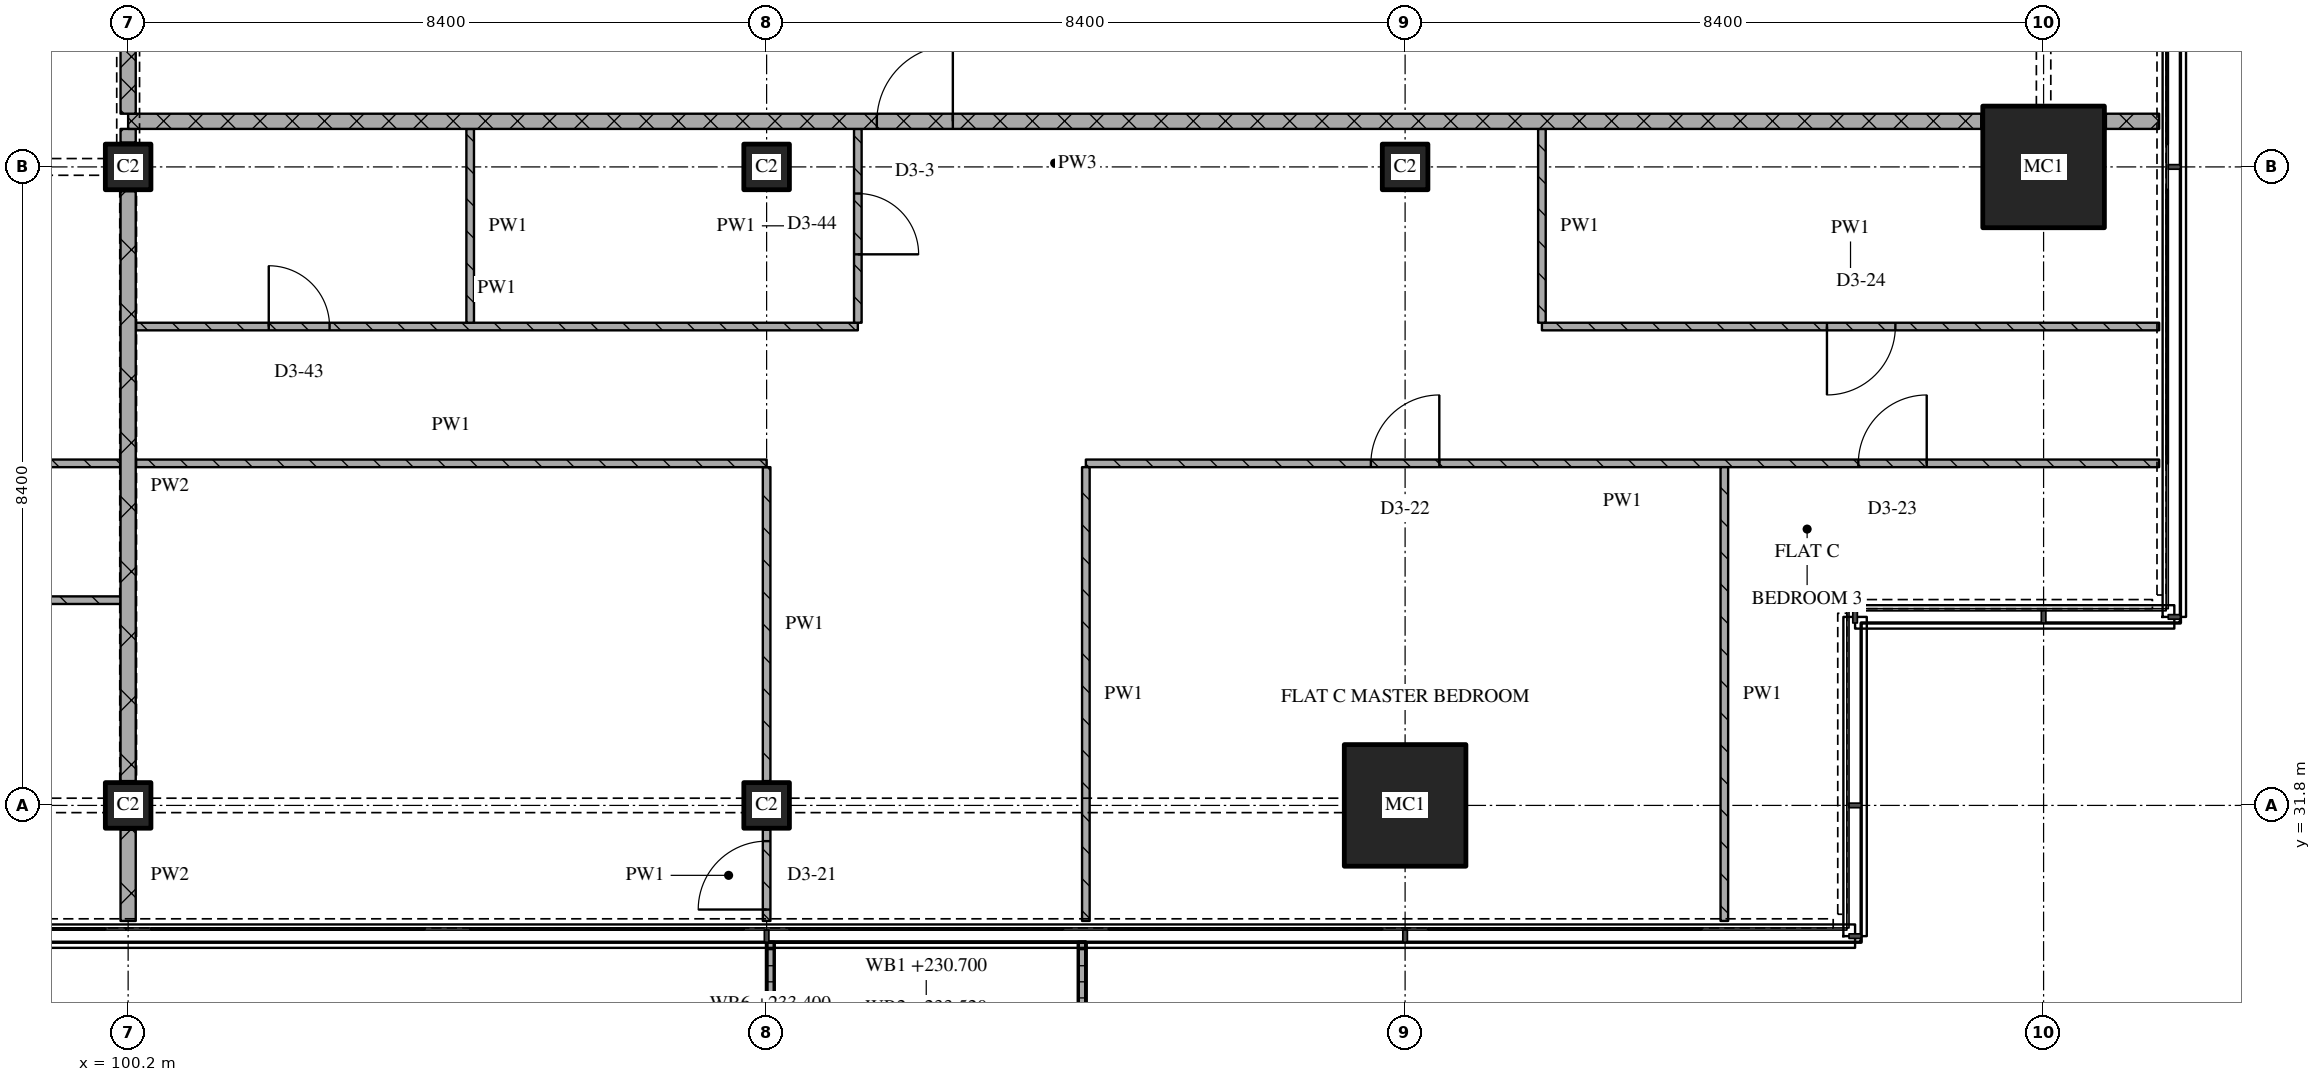
"""IFC4 building model, lengths in metres.
Left out: names, types, materials, properties, quantities, classifications, styles, units other than length and angle.
Written with IfcOpenShell. Run it as: python <this file> out.ifc"""

import sys

from ifc_helpers import new_model, si_unit, direction, frame, frame_2d, origin, origin_2d, place, context, subcontext, project, spatial, polyline, rectangle, outline, extrude, element, fill, save


model = new_model("IFC4")
c1 = context("Model", 3, precision=1e-05, world=origin(), true_north=direction((0.0, 1.0)))
c2 = subcontext(c1, "Body", "Model", "MODEL_VIEW")
j1 = project(units=[si_unit("LENGTHUNIT", "METRE"), si_unit("PLANEANGLEUNIT", "RADIAN")], contexts=[c1])
p1 = place(None, origin())
s1 = spatial("IfcSite", under=j1, at=p1, CompositionType="ELEMENT")
p2 = place(p1, origin())
s2 = spatial("IfcBuilding", under=s1, at=p2, CompositionType="ELEMENT")
p3 = place(p2, frame((0.0, 0.0, 230.7)))
s3 = spatial("IfcBuildingStorey", under=s2, at=p3, CompositionType="ELEMENT", Elevation=230.7)
for number, where, z_axis, x_axis in (
    (1, (100.2, 31.8, 0.0), (0.0, 0.0, 1.0), (1.0, 0.0, 0.0)),
    (2, (100.2, 40.2, 0.0), (0.0, 0.0, 1.0), (1.0, 0.0, 0.0)),
    (3, (108.6, 31.8, 0.0), (0.0, 0.0, 1.0), (1.0, 0.0, 0.0)),
    (4, (108.6, 40.2, 0.0), (0.0, 0.0, 1.0), (1.0, 0.0, 0.0)),
):
    element("IfcColumn", number, at=place(p3, frame(where, z_axis=z_axis, x_axis=x_axis)), inside=s3, PredefinedType="COLUMN", context=c2, shape_type="SweptSolid", body=[
        extrude(rectangle(XDim=0.6, YDim=0.6, at=origin_2d()), origin(), (0.0, 0.0, 1.0), 3.6),
    ])
p4 = place(p3, frame((117.0, 31.8, 0.0), z_axis=(0.0, 0.0, 1.0), x_axis=(1.0, 0.0, 0.0)))
e5 = element("IfcColumn", 5, at=p4, inside=s3, PredefinedType="COLUMN", context=c2, shape_type="SweptSolid", body=[
    extrude(rectangle(XDim=1.6, YDim=1.6, at=origin_2d()), origin(), (0.0, 0.0, 1.0), 3.6),
])
p5 = place(p3, frame((117.0, 40.2, 0.0), z_axis=(0.0, 0.0, 1.0), x_axis=(1.0, 0.0, 0.0)))
e6 = element("IfcColumn", 6, at=p5, inside=s3, PredefinedType="COLUMN", context=c2, shape_type="SweptSolid", body=[
    extrude(rectangle(XDim=0.6, YDim=0.6, at=origin_2d()), origin(), (0.0, 0.0, 1.0), 3.6),
])
p6 = place(p3, frame((125.4, 40.2, 0.0), z_axis=(0.0, 0.0, 1.0), x_axis=(1.0, 0.0, 0.0)))
e7 = element("IfcColumn", 7, at=p6, inside=s3, PredefinedType="COLUMN", context=c2, shape_type="SweptSolid", body=[
    extrude(rectangle(XDim=1.6, YDim=1.6, at=origin_2d()), origin(), (0.0, 0.0, 1.0), 3.6),
])
p7 = place(p3, origin())
e8 = element("IfcWall", 8, at=p7, inside=s3, PredefinedType="SOLIDWALL", context=c2, shape_type="SweptSolid", body=[
    extrude(outline(polyline([(108.6, 30.0), (108.7, 30.0), (108.7, 28.367), (112.7, 28.367), (112.7, 30.0), (112.8, 30.0), (112.8, 28.267), (108.6, 28.267), (108.6, 30.0)])), origin(), (0.0, 0.0, 1.0), 1.0),
])
p8 = place(p3, frame((100.1, 34.5, 0.0), z_axis=(0.0, 0.0, 1.0), x_axis=(-1.0, 0.0, 0.0)))
e9 = element("IfcWall", 9, at=p8, inside=s3, PredefinedType="PARTITIONING", context=c2, shape_type="SweptSolid", body=[
    extrude(rectangle(XDim=20.9, YDim=0.1, at=frame_2d((10.45, 0.0))), origin(), (0.0, 0.0, 1.0), 3.32),
])
p9 = place(p8, frame((3.65, 0.0, 0.0)))
e10 = element("IfcOpeningElement", 10, at=p9, cuts=e9, PredefinedType="OPENING", context=c2, shape_type="SweptSolid", body=[
    extrude(rectangle(XDim=0.9, YDim=2.1, at=frame_2d((0.45, 1.05))), frame((0.0, 0.06, 0.0), z_axis=(0.0, -1.0, 0.0), x_axis=(1.0, 0.0, 0.0)), (0.0, 0.0, 1.0), 0.12),
])
p10 = place(p8, frame((9.95, 0.0, 0.0)))
e11 = element("IfcOpeningElement", 11, at=p10, cuts=e9, PredefinedType="OPENING", context=c2, shape_type="SweptSolid", body=[
    extrude(rectangle(XDim=0.9, YDim=2.1, at=frame_2d((0.45, 1.05))), frame((0.0, 0.06, 0.0), z_axis=(0.0, -1.0, 0.0), x_axis=(1.0, 0.0, 0.0)), (0.0, 0.0, 1.0), 0.12),
])
p11 = place(p8, frame((14.15, 0.0, 0.0)))
e12 = element("IfcOpeningElement", 12, at=p11, cuts=e9, PredefinedType="OPENING", context=c2, shape_type="SweptSolid", body=[
    extrude(rectangle(XDim=0.9, YDim=2.1, at=frame_2d((0.45, 1.05))), frame((0.0, 0.06, 0.0), z_axis=(0.0, -1.0, 0.0), x_axis=(1.0, 0.0, 0.0)), (0.0, 0.0, 1.0), 0.12),
])
p12 = place(p8, frame((18.35, 0.0, 0.0)))
e13 = element("IfcOpeningElement", 13, at=p12, cuts=e9, PredefinedType="OPENING", context=c2, shape_type="SweptSolid", body=[
    extrude(rectangle(XDim=0.9, YDim=2.1, at=frame_2d((0.45, 1.05))), frame((0.0, 0.06, 0.0), z_axis=(0.0, -1.0, 0.0), x_axis=(1.0, 0.0, 0.0)), (0.0, 0.0, 1.0), 0.12),
])
p13 = place(p3, frame((126.92, 36.3, 0.0), z_axis=(0.0, 0.0, 1.0), x_axis=(-1.0, 0.0, 0.0)))
e14 = element("IfcWall", 14, at=p13, inside=s3, PredefinedType="PARTITIONING", context=c2, shape_type="SweptSolid", body=[
    extrude(rectangle(XDim=14.12, YDim=0.1, at=frame_2d((7.06, 0.0))), origin(), (0.0, 0.0, 1.0), 3.32),
])
p14 = place(p13, frame((3.058, 0.0, 0.0)))
e15 = element("IfcOpeningElement", 15, at=p14, cuts=e14, PredefinedType="OPENING", context=c2, shape_type="SweptSolid", body=[
    extrude(rectangle(XDim=0.9, YDim=2.1, at=frame_2d((0.45, 1.05))), frame((0.0, 0.06, 0.0), z_axis=(0.0, -1.0, 0.0), x_axis=(1.0, 0.0, 0.0)), (0.0, 0.0, 1.0), 0.12),
])
p15 = place(p13, frame((9.47, 0.0, 0.0)))
e16 = element("IfcOpeningElement", 16, at=p15, cuts=e14, PredefinedType="OPENING", context=c2, shape_type="SweptSolid", body=[
    extrude(rectangle(XDim=0.9, YDim=2.1, at=frame_2d((0.45, 1.05))), frame((0.0, 0.06, 0.0), z_axis=(0.0, -1.0, 0.0), x_axis=(1.0, 0.0, 0.0)), (0.0, 0.0, 1.0), 0.12),
])
p16 = place(p3, frame((100.3, 38.1, 0.0), z_axis=(0.0, 0.0, 1.0), x_axis=(1.0, 0.0, 0.0)))
e17 = element("IfcWall", 17, at=p16, inside=s3, PredefinedType="PARTITIONING", context=c2, shape_type="SweptSolid", body=[
    extrude(rectangle(XDim=9.5, YDim=0.1, at=frame_2d((4.75, 0.0))), origin(), (0.0, 0.0, 1.0), 3.32),
])
p17 = place(p16, frame((1.75, 0.0, 0.0)))
e18 = element("IfcOpeningElement", 18, at=p17, cuts=e17, PredefinedType="OPENING", context=c2, shape_type="SweptSolid", body=[
    extrude(rectangle(XDim=0.8, YDim=2.1, at=frame_2d((0.4, 1.05))), frame((0.0, 0.06, 0.0), z_axis=(0.0, -1.0, 0.0), x_axis=(1.0, 0.0, 0.0)), (0.0, 0.0, 1.0), 0.12),
])
p18 = place(p3, frame((118.8, 38.1, 0.0), z_axis=(0.0, 0.0, 1.0), x_axis=(1.0, 0.0, 0.0)))
e19 = element("IfcWall", 19, at=p18, inside=s3, PredefinedType="PARTITIONING", context=c2, shape_type="SweptSolid", body=[
    extrude(rectangle(XDim=8.12, YDim=0.1, at=frame_2d((4.06, 0.0))), origin(), (0.0, 0.0, 1.0), 3.32),
])
p19 = place(p18, frame((3.75, 0.0, 0.0)))
e20 = element("IfcOpeningElement", 20, at=p19, cuts=e19, PredefinedType="OPENING", context=c2, shape_type="SweptSolid", body=[
    extrude(rectangle(XDim=0.9, YDim=2.1, at=frame_2d((0.45, 1.05))), frame((0.0, 0.06, 0.0), z_axis=(0.0, -1.0, 0.0), x_axis=(1.0, 0.0, 0.0)), (0.0, 0.0, 1.0), 0.12),
])
p20 = place(p3, frame((124.58, 40.8, 0.0), z_axis=(0.0, 0.0, 1.0), x_axis=(-1.0, 0.0, 0.0)))
e21 = element("IfcWall", 21, at=p20, inside=s3, PredefinedType="PARTITIONING", context=c2, shape_type="SweptSolid", body=[
    extrude(rectangle(XDim=24.38, YDim=0.2, at=frame_2d((12.19, 0.0))), origin(), (0.0, 0.0, 1.0), 3.32),
])
p21 = place(p20, frame((13.53, 0.0, 0.0)))
e22 = element("IfcOpeningElement", 22, at=p21, cuts=e21, PredefinedType="OPENING", context=c2, shape_type="SweptSolid", body=[
    extrude(rectangle(XDim=1.0, YDim=2.1, at=frame_2d((0.5, 1.05))), frame((0.0, 0.11, 0.0), z_axis=(0.0, -1.0, 0.0), x_axis=(1.0, 0.0, 0.0)), (0.0, 0.0, 1.0), 0.22),
])
p22 = place(p3, frame((126.22, 40.8, 0.0), z_axis=(0.0, 0.0, 1.0), x_axis=(1.0, 0.0, 0.0)))
e23 = element("IfcWall", 23, at=p22, inside=s3, PredefinedType="PARTITIONING", context=c2, shape_type="SweptSolid", body=[
    extrude(rectangle(XDim=0.7, YDim=0.2, at=frame_2d((0.35, 0.0))), origin(), (0.0, 0.0, 1.0), 3.32),
])
p23 = place(p3, frame((100.2, 43.1, 0.0), z_axis=(0.0, 0.0, 1.0), x_axis=(0.0, -1.0, 0.0)))
e24 = element("IfcWall", 24, at=p23, inside=s3, PredefinedType="PARTITIONING", context=c2, shape_type="SweptSolid", body=[
    extrude(rectangle(XDim=2.2, YDim=0.2, at=frame_2d((1.1, 0.0))), origin(), (0.0, 0.0, 1.0), 2.53),
])
p24 = place(p3, frame((100.2, 31.48, 0.0), z_axis=(0.0, 0.0, 1.0), x_axis=(0.0, -1.0, 0.0)))
e25 = element("IfcWall", 25, at=p24, inside=s3, PredefinedType="PARTITIONING", context=c2, shape_type="SweptSolid", body=[
    extrude(rectangle(XDim=1.2, YDim=0.2, at=frame_2d((0.6, 0.0))), origin(), (0.0, 0.0, 1.0), 3.32),
])
p25 = place(p3, frame((100.2, 39.88, 0.0), z_axis=(0.0, 0.0, 1.0), x_axis=(0.0, -1.0, 0.0)))
e26 = element("IfcWall", 26, at=p25, inside=s3, PredefinedType="PARTITIONING", context=c2, shape_type="SweptSolid", body=[
    extrude(rectangle(XDim=7.76, YDim=0.2, at=frame_2d((3.88, 0.0))), origin(), (0.0, 0.0, 1.0), 2.72),
])
p26 = place(p3, frame((100.2, 40.7, 0.0), z_axis=(0.0, 0.0, 1.0), x_axis=(0.0, -1.0, 0.0)))
e27 = element("IfcWall", 27, at=p26, inside=s3, PredefinedType="PARTITIONING", context=c2, shape_type="SweptSolid", body=[
    extrude(rectangle(XDim=0.18, YDim=0.2, at=frame_2d((0.09, 0.0))), origin(), (0.0, 0.0, 1.0), 3.32),
])
p27 = place(p3, frame((104.7, 40.7, 0.0), z_axis=(0.0, 0.0, 1.0), x_axis=(0.0, -1.0, 0.0)))
e28 = element("IfcWall", 28, at=p27, inside=s3, PredefinedType="PARTITIONING", context=c2, shape_type="SweptSolid", body=[
    extrude(rectangle(XDim=2.55, YDim=0.1, at=frame_2d((1.275, 0.0))), origin(), (0.0, 0.0, 1.0), 3.32),
])
p28 = place(p3, frame((108.6, 30.28, 0.0), z_axis=(0.0, 0.0, 1.0), x_axis=(0.0, 1.0, 0.0)))
e29 = element("IfcWall", 29, at=p28, inside=s3, PredefinedType="PARTITIONING", context=c2, shape_type="SweptSolid", body=[
    extrude(rectangle(XDim=1.2, YDim=0.1, at=frame_2d((0.6, 0.0))), origin(), (0.0, 0.0, 1.0), 3.32),
])
p29 = place(p28, frame((0.15, 0.0, 0.0)))
e30 = element("IfcOpeningElement", 30, at=p29, cuts=e29, PredefinedType="OPENING", context=c2, shape_type="SweptSolid", body=[
    extrude(rectangle(XDim=0.9, YDim=2.1, at=frame_2d((0.45, 1.05))), frame((0.0, 0.06, 0.0), z_axis=(0.0, -1.0, 0.0), x_axis=(1.0, 0.0, 0.0)), (0.0, 0.0, 1.0), 0.12),
])
p30 = place(p3, frame((108.6, 36.25, 0.0), z_axis=(0.0, 0.0, 1.0), x_axis=(0.0, -1.0, 0.0)))
e31 = element("IfcWall", 31, at=p30, inside=s3, PredefinedType="PARTITIONING", context=c2, shape_type="SweptSolid", body=[
    extrude(rectangle(XDim=4.13, YDim=0.1, at=frame_2d((2.065, 0.0))), origin(), (0.0, 0.0, 1.0), 3.32),
])
p31 = place(p3, frame((109.8, 38.15, 0.0), z_axis=(0.0, 0.0, 1.0), x_axis=(0.0, 1.0, 0.0)))
e32 = element("IfcWall", 32, at=p31, inside=s3, PredefinedType="PARTITIONING", context=c2, shape_type="SweptSolid", body=[
    extrude(rectangle(XDim=2.55, YDim=0.1, at=frame_2d((1.275, 0.0))), origin(), (0.0, 0.0, 1.0), 3.32),
])
p32 = place(p31, frame((0.9, 0.0, 0.0)))
e33 = element("IfcOpeningElement", 33, at=p32, cuts=e32, PredefinedType="OPENING", context=c2, shape_type="SweptSolid", body=[
    extrude(rectangle(XDim=0.8, YDim=2.1, at=frame_2d((0.4, 1.05))), frame((0.0, 0.06, 0.0), z_axis=(0.0, -1.0, 0.0), x_axis=(1.0, 0.0, 0.0)), (0.0, 0.0, 1.0), 0.12),
])
p33 = place(p3, frame((112.8, 36.25, 0.0), z_axis=(0.0, 0.0, 1.0), x_axis=(0.0, -1.0, 0.0)))
e34 = element("IfcWall", 34, at=p33, inside=s3, PredefinedType="PARTITIONING", context=c2, shape_type="SweptSolid", body=[
    extrude(rectangle(XDim=5.97, YDim=0.1, at=frame_2d((2.985, 0.0))), origin(), (0.0, 0.0, 1.0), 3.32),
])
p34 = place(p3, frame((118.8, 40.7, 0.0), z_axis=(0.0, 0.0, 1.0), x_axis=(0.0, -1.0, 0.0)))
e35 = element("IfcWall", 35, at=p34, inside=s3, PredefinedType="PARTITIONING", context=c2, shape_type="SweptSolid", body=[
    extrude(rectangle(XDim=2.55, YDim=0.1, at=frame_2d((1.275, 0.0))), origin(), (0.0, 0.0, 1.0), 3.32),
])
p35 = place(p3, frame((121.2, 36.25, 0.0), z_axis=(0.0, 0.0, 1.0), x_axis=(0.0, -1.0, 0.0)))
e36 = element("IfcWall", 36, at=p35, inside=s3, PredefinedType="PARTITIONING", context=c2, shape_type="SweptSolid", body=[
    extrude(rectangle(XDim=5.97, YDim=0.1, at=frame_2d((2.985, 0.0))), origin(), (0.0, 0.0, 1.0), 3.32),
])
p36 = place(p3, frame((92.942, 36.3, 0.0), z_axis=(0.0, 0.0, 1.0), x_axis=(1.0, 0.0, 0.0)))
e37 = element("IfcWall", 37, at=p36, inside=s3, PredefinedType="PARTITIONING", context=c2, shape_type="SweptSolid", body=[
    extrude(rectangle(XDim=7.158, YDim=0.1, at=frame_2d((3.579, 0.0))), origin(), (0.0, 0.0, 1.0), 3.32),
])
p37 = place(p36, frame((3.179, 0.0, 0.0)))
e38 = element("IfcOpeningElement", 38, at=p37, cuts=e37, PredefinedType="OPENING", context=c2, shape_type="SweptSolid", body=[
    extrude(rectangle(XDim=0.9, YDim=2.1, at=frame_2d((0.45, 1.05))), frame((0.0, 0.06, 0.0), z_axis=(0.0, -1.0, 0.0), x_axis=(1.0, 0.0, 0.0)), (0.0, 0.0, 1.0), 0.12),
])
p38 = place(p3, frame((100.3, 36.3, 0.0), z_axis=(0.0, 0.0, 1.0), x_axis=(1.0, 0.0, 0.0)))
e39 = element("IfcWall", 39, at=p38, inside=s3, PredefinedType="PARTITIONING", context=c2, shape_type="SweptSolid", body=[
    extrude(rectangle(XDim=8.3, YDim=0.1, at=frame_2d((4.15, 0.0))), origin(), (0.0, 0.0, 1.0), 3.32),
])
p39 = place(p14, origin())
e40 = element("IfcDoor", 40, at=p39, inside=s3, OperationType="SINGLE_SWING_RIGHT", PredefinedType="DOOR", context=c2, shape_type="SweptSolid", body=[
    extrude(rectangle(XDim=0.9, YDim=2.1, at=frame_2d((0.45, 1.05))), frame((0.0, 0.025, 0.0), z_axis=(0.0, -1.0, 0.0), x_axis=(1.0, 0.0, 0.0)), (0.0, 0.0, 1.0), 0.05),
])
fill(e15, e40)
p40 = place(p15, origin())
e41 = element("IfcDoor", 41, at=p40, inside=s3, OperationType="SINGLE_SWING_RIGHT", PredefinedType="DOOR", context=c2, shape_type="SweptSolid", body=[
    extrude(rectangle(XDim=0.9, YDim=2.1, at=frame_2d((0.45, 1.05))), frame((0.0, 0.025, 0.0), z_axis=(0.0, -1.0, 0.0), x_axis=(1.0, 0.0, 0.0)), (0.0, 0.0, 1.0), 0.05),
])
fill(e16, e41)
p41 = place(p17, origin())
e42 = element("IfcDoor", 42, at=p41, inside=s3, OperationType="SINGLE_SWING_LEFT", PredefinedType="DOOR", context=c2, shape_type="SweptSolid", body=[
    extrude(rectangle(XDim=0.8, YDim=2.1, at=frame_2d((0.4, 1.05))), frame((0.0, 0.025, 0.0), z_axis=(0.0, -1.0, 0.0), x_axis=(1.0, 0.0, 0.0)), (0.0, 0.0, 1.0), 0.05),
])
fill(e18, e42)
p42 = place(p19, origin())
e43 = element("IfcDoor", 43, at=p42, inside=s3, OperationType="SINGLE_SWING_RIGHT", PredefinedType="DOOR", context=c2, shape_type="SweptSolid", body=[
    extrude(rectangle(XDim=0.9, YDim=2.1, at=frame_2d((0.45, 1.05))), frame((0.0, 0.025, 0.0), z_axis=(0.0, -1.0, 0.0), x_axis=(1.0, 0.0, 0.0)), (0.0, 0.0, 1.0), 0.05),
])
fill(e20, e43)
p43 = place(p21, origin())
e44 = element("IfcDoor", 44, at=p43, inside=s3, OperationType="SINGLE_SWING_RIGHT", PredefinedType="DOOR", context=c2, shape_type="SweptSolid", body=[
    extrude(rectangle(XDim=1.0, YDim=2.1, at=frame_2d((0.5, 1.05))), frame((0.0, 0.025, 0.0), z_axis=(0.0, -1.0, 0.0), x_axis=(1.0, 0.0, 0.0)), (0.0, 0.0, 1.0), 0.05),
])
fill(e22, e44)
p44 = place(p29, origin())
e45 = element("IfcDoor", 45, at=p44, inside=s3, OperationType="SINGLE_SWING_LEFT", PredefinedType="DOOR", context=c2, shape_type="SweptSolid", body=[
    extrude(rectangle(XDim=0.9, YDim=2.1, at=frame_2d((0.45, 1.05))), frame((0.0, 0.025, 0.0), z_axis=(0.0, -1.0, 0.0), x_axis=(1.0, 0.0, 0.0)), (0.0, 0.0, 1.0), 0.05),
])
fill(e30, e45)
p45 = place(p32, origin())
e46 = element("IfcDoor", 46, at=p45, inside=s3, OperationType="SINGLE_SWING_RIGHT", PredefinedType="DOOR", context=c2, shape_type="SweptSolid", body=[
    extrude(rectangle(XDim=0.8, YDim=2.1, at=frame_2d((0.4, 1.05))), frame((0.0, 0.025, 0.0), z_axis=(0.0, -1.0, 0.0), x_axis=(1.0, 0.0, 0.0)), (0.0, 0.0, 1.0), 0.05),
])
fill(e33, e46)
save(model, sys.argv[1])
